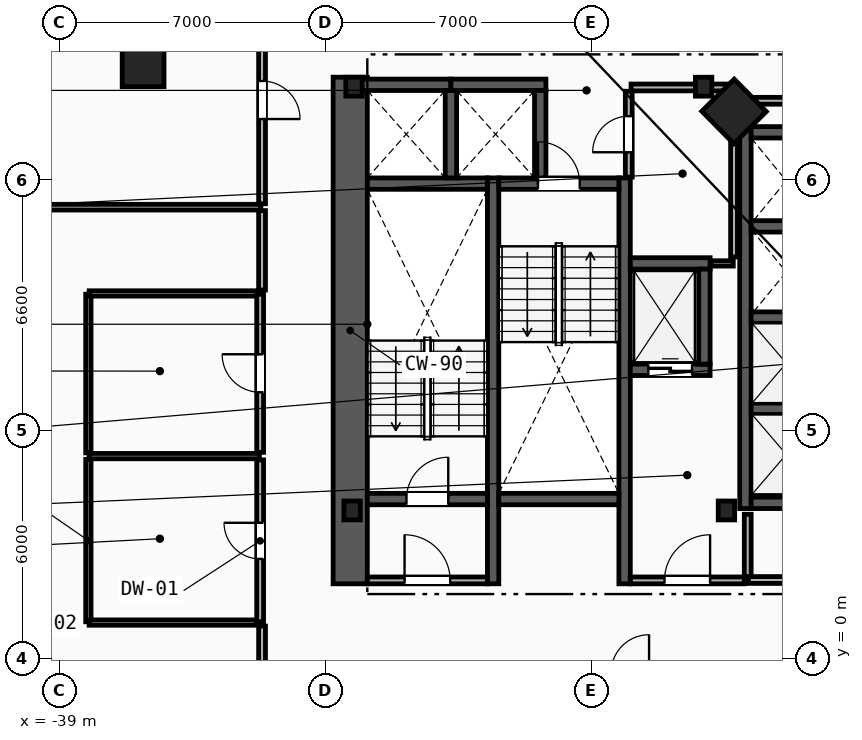
"""IFC4 building model, lengths in metres.
Left out: names, types, materials, properties, quantities, classifications, styles, units other than length and angle.
Written with IfcOpenShell. Run it as: python <this file> out.ifc"""

import sys

from ifc_helpers import new_model, si_unit, direction, frame, frame_2d, origin, origin_2d, place, context, subcontext, project, spatial, rectangle, i_section, extrude, element, fill, save


model = new_model("IFC4")
c1 = context("Model", 3, precision=1e-05, world=origin(), true_north=direction((0.0, 1.0)))
c2 = subcontext(c1, "Body", "Model", "MODEL_VIEW")
j1 = project(units=[si_unit("LENGTHUNIT", "METRE"), si_unit("PLANEANGLEUNIT", "RADIAN")], contexts=[c1])
p1 = place(None, origin())
s1 = spatial("IfcSite", under=j1, at=p1, CompositionType="ELEMENT")
p2 = place(p1, origin())
s2 = spatial("IfcBuilding", under=s1, at=p2, CompositionType="ELEMENT")
p3 = place(p2, frame((0.0, 0.0, 65.8)))
s3 = spatial("IfcBuildingStorey", under=s2, at=p3, CompositionType="ELEMENT", Elevation=65.8)
for number, where, z_axis, x_axis in (
    (1, (-31.3, 3.9, 0.0), (0.0, 0.0, 1.0), (1.0, 0.0, 0.0)),
    (2, (-21.45, 3.9, 0.0), (0.0, 0.0, 1.0), (1.0, 0.0, 0.0)),
    (3, (-22.05, 15.05, 0.0), (0.0, 0.0, 1.0), (1.0, 0.0, 0.0)),
    (4, (-31.25, 15.05, 0.0), (0.0, 0.0, 1.0), (1.0, 0.0, 0.0)),
):
    element("IfcColumn", number, at=place(p3, frame(where, z_axis=z_axis, x_axis=x_axis)), inside=s3, PredefinedType="COLUMN", context=c2, shape_type="SweptSolid", body=[
        extrude(i_section(OverallWidth=0.432, OverallDepth=0.498, WebThickness=0.056, FlangeThickness=0.089, FilletRadius=0.018, at=origin_2d()), origin(), (0.0, 0.0, 1.0), 3.8),
    ])
p4 = place(p3, frame((-36.8, 15.6, 0.0), z_axis=(0.0, 0.0, 1.0), x_axis=(1.0, 0.0, 0.0)))
e5 = element("IfcColumn", 5, at=p4, inside=s3, PredefinedType="COLUMN", context=c2, shape_type="SweptSolid", body=[
    extrude(rectangle(XDim=1.1, YDim=1.1, at=origin_2d()), origin(), (0.0, 0.0, 1.0), 3.8),
])
p5 = place(p3, frame((-21.25, 14.4, 0.0), z_axis=(0.0, 0.0, 1.0), x_axis=(-0.703270634186, 0.710922228581, 0.0)))
e6 = element("IfcColumn", 6, at=p5, inside=s3, PredefinedType="COLUMN", context=c2, shape_type="SweptSolid", body=[
    extrude(rectangle(XDim=1.2, YDim=1.2, at=origin_2d()), origin(), (0.0, 0.0, 1.0), 3.8),
])
p6 = place(p3, frame((-31.35, 1.97, 0.0), z_axis=(0.0, 0.0, 1.0), x_axis=(0.0, 1.0, 0.0)))
e7 = element("IfcWall", 7, at=p6, inside=s3, PredefinedType="SHEAR", context=c2, shape_type="SweptSolid", body=[
    extrude(rectangle(XDim=13.33, YDim=0.9, at=frame_2d((6.665, 0.0))), origin(), (0.0, 0.0, 1.0), 3.5),
])
for number, where, z_axis, x_axis in (
    (8, (-27.59, 1.97, 0.0), (0.0, 0.0, 1.0), (0.0, 1.0, 0.0)),
    (9, (-24.13, 1.97, 0.0), (0.0, 0.0, 1.0), (0.0, 1.0, 0.0)),
):
    element("IfcWall", number, at=place(p3, frame(where, z_axis=z_axis, x_axis=x_axis)), inside=s3, PredefinedType="SHEAR", context=c2, shape_type="SweptSolid", body=[
        extrude(rectangle(XDim=10.68, YDim=0.3, at=frame_2d((5.34, 0.0))), origin(), (0.0, 0.0, 1.0), 3.5),
    ])
p7 = place(p3, frame((-30.9, 4.2, 0.0), z_axis=(0.0, 0.0, 1.0), x_axis=(1.0, 0.0, 0.0)))
e10 = element("IfcWall", 10, at=p7, inside=s3, PredefinedType="SHEAR", context=c2, shape_type="SweptSolid", body=[
    extrude(rectangle(XDim=3.16, YDim=0.3, at=frame_2d((1.58, 0.0))), origin(), (0.0, 0.0, 1.0), 3.5),
])
p8 = place(p7, frame((1.03, 0.0, 0.0)))
e11 = element("IfcOpeningElement", 11, at=p8, cuts=e10, PredefinedType="OPENING", context=c2, shape_type="SweptSolid", body=[
    extrude(rectangle(XDim=1.1, YDim=2.15, at=frame_2d((0.55, 1.075))), frame((0.0, 0.16, 0.0), z_axis=(0.0, -1.0, 0.0), x_axis=(1.0, 0.0, 0.0)), (0.0, 0.0, 1.0), 0.32),
])
p9 = place(p3, frame((-30.9, 12.5, 0.0), z_axis=(0.0, 0.0, 1.0), x_axis=(1.0, 0.0, 0.0)))
e12 = element("IfcWall", 12, at=p9, inside=s3, PredefinedType="SHEAR", context=c2, shape_type="SweptSolid", body=[
    extrude(rectangle(XDim=3.16, YDim=0.3, at=frame_2d((1.58, 0.0))), origin(), (0.0, 0.0, 1.0), 3.5),
])
p10 = place(p3, frame((-27.44, 12.5, 0.0), z_axis=(0.0, 0.0, 1.0), x_axis=(1.0, 0.0, 0.0)))
e13 = element("IfcWall", 13, at=p10, inside=s3, PredefinedType="SHEAR", context=c2, shape_type="SweptSolid", body=[
    extrude(rectangle(XDim=3.16, YDim=0.3, at=frame_2d((1.58, 0.0))), origin(), (0.0, 0.0, 1.0), 3.5),
])
p11 = place(p10, frame((1.03, 0.0, 0.0)))
e14 = element("IfcOpeningElement", 14, at=p11, cuts=e13, PredefinedType="OPENING", context=c2, shape_type="SweptSolid", body=[
    extrude(rectangle(XDim=1.1, YDim=2.15, at=frame_2d((0.55, 1.075))), frame((0.0, 0.16, 0.0), z_axis=(0.0, -1.0, 0.0), x_axis=(1.0, 0.0, 0.0)), (0.0, 0.0, 1.0), 0.32),
])
p12 = place(p3, frame((-27.44, 4.2, 0.0), z_axis=(0.0, 0.0, 1.0), x_axis=(1.0, 0.0, 0.0)))
e15 = element("IfcWall", 15, at=p12, inside=s3, PredefinedType="SHEAR", context=c2, shape_type="SweptSolid", body=[
    extrude(rectangle(XDim=3.16, YDim=0.3, at=frame_2d((1.58, 0.0))), origin(), (0.0, 0.0, 1.0), 3.5),
])
p13 = place(p3, frame((-20.89, 2.15, 0.0), z_axis=(0.0, 0.0, 1.0), x_axis=(0.0, 1.0, 0.0)))
e16 = element("IfcWall", 16, at=p13, inside=s3, PredefinedType="PARTITIONING", context=c2, shape_type="SweptSolid", body=[
    extrude(rectangle(XDim=1.65, YDim=0.18, at=frame_2d((0.825, 0.0))), origin(), (0.0, 0.0, 1.0), 3.5),
])
p14 = place(p3, frame((-23.98, 2.06, 0.0), z_axis=(0.0, 0.0, 1.0), x_axis=(1.0, 0.0, 0.0)))
e17 = element("IfcWall", 17, at=p14, inside=s3, PredefinedType="PARTITIONING", context=c2, shape_type="SweptSolid", body=[
    extrude(rectangle(XDim=3.0, YDim=0.18, at=frame_2d((1.5, 0.0))), origin(), (0.0, 0.0, 1.0), 3.5),
])
p15 = place(p14, frame((0.9, 0.0, 0.0)))
e18 = element("IfcOpeningElement", 18, at=p15, cuts=e17, PredefinedType="OPENING", context=c2, shape_type="SweptSolid", body=[
    extrude(rectangle(XDim=1.2, YDim=2.15, at=frame_2d((0.6, 1.075))), frame((0.0, 0.1, 0.0), z_axis=(0.0, -1.0, 0.0), x_axis=(1.0, 0.0, 0.0)), (0.0, 0.0, 1.0), 0.2),
])
p16 = place(p3, frame((-30.9, 2.06, 0.0), z_axis=(0.0, 0.0, 1.0), x_axis=(1.0, 0.0, 0.0)))
e19 = element("IfcWall", 19, at=p16, inside=s3, PredefinedType="PARTITIONING", context=c2, shape_type="SweptSolid", body=[
    extrude(rectangle(XDim=3.16, YDim=0.18, at=frame_2d((1.58, 0.0))), origin(), (0.0, 0.0, 1.0), 3.5),
])
p17 = place(p16, frame((0.98, 0.0, 0.0)))
e20 = element("IfcOpeningElement", 20, at=p17, cuts=e19, PredefinedType="OPENING", context=c2, shape_type="SweptSolid", body=[
    extrude(rectangle(XDim=1.2, YDim=2.15, at=frame_2d((0.6, 1.075))), frame((0.0, 0.1, 0.0), z_axis=(0.0, -1.0, 0.0), x_axis=(1.0, 0.0, 0.0)), (0.0, 0.0, 1.0), 0.2),
])
p18 = place(p3, frame((-23.98, 7.6, 0.0), z_axis=(0.0, 0.0, 1.0), x_axis=(1.0, 0.0, 0.0)))
e21 = element("IfcWall", 21, at=p18, inside=s3, PredefinedType="SHEAR", context=c2, shape_type="SweptSolid", body=[
    extrude(rectangle(XDim=2.1, YDim=0.3, at=frame_2d((1.05, 0.0))), origin(), (0.0, 0.0, 1.0), 3.5),
])
p19 = place(p18, frame((0.475, 0.0, 0.0)))
e22 = element("IfcOpeningElement", 22, at=p19, cuts=e21, PredefinedType="OPENING", context=c2, shape_type="SweptSolid", body=[
    extrude(rectangle(XDim=1.15, YDim=2.2, at=frame_2d((0.575, 1.1))), frame((0.0, 0.16, 0.0), z_axis=(0.0, -1.0, 0.0), x_axis=(1.0, 0.0, 0.0)), (0.0, 0.0, 1.0), 0.32),
])
p20 = place(p3, frame((-23.98, 10.4, 0.0), z_axis=(0.0, 0.0, 1.0), x_axis=(1.0, 0.0, 0.0)))
e23 = element("IfcWall", 23, at=p20, inside=s3, PredefinedType="SHEAR", context=c2, shape_type="SweptSolid", body=[
    extrude(rectangle(XDim=2.1, YDim=0.3, at=frame_2d((1.05, 0.0))), origin(), (0.0, 0.0, 1.0), 3.5),
])
for number, where, z_axis, x_axis in (
    (24, (-22.03, 7.75, 0.0), (0.0, 0.0, 1.0), (0.0, 1.0, 0.0)),
    (25, (-31.2, 15.1, 0.0), (0.0, 0.0, 1.0), (1.0, 0.0, 0.0)),
):
    element("IfcWall", number, at=place(p3, frame(where, z_axis=z_axis, x_axis=x_axis)), inside=s3, PredefinedType="SHEAR", context=c2, shape_type="SweptSolid", body=[
        extrude(rectangle(XDim=2.5, YDim=0.3, at=frame_2d((1.25, 0.0))), origin(), (0.0, 0.0, 1.0), 3.5),
    ])
p21 = place(p3, frame((-28.7, 12.65, 0.0), z_axis=(0.0, 0.0, 1.0), x_axis=(0.0, 1.0, 0.0)))
e26 = element("IfcWall", 26, at=p21, inside=s3, PredefinedType="SHEAR", context=c2, shape_type="SweptSolid", body=[
    extrude(rectangle(XDim=2.3, YDim=0.3, at=frame_2d((1.15, 0.0))), origin(), (0.0, 0.0, 1.0), 3.5),
])
p22 = place(p3, frame((-28.7, 15.1, 0.0), z_axis=(0.0, 0.0, 1.0), x_axis=(1.0, 0.0, 0.0)))
e27 = element("IfcWall", 27, at=p22, inside=s3, PredefinedType="SHEAR", context=c2, shape_type="SweptSolid", body=[
    extrude(rectangle(XDim=2.5, YDim=0.3, at=frame_2d((1.25, 0.0))), origin(), (0.0, 0.0, 1.0), 3.5),
])
p23 = place(p3, frame((-26.35, 12.65, 0.0), z_axis=(0.0, 0.0, 1.0), x_axis=(0.0, 1.0, 0.0)))
e28 = element("IfcWall", 28, at=p23, inside=s3, PredefinedType="SHEAR", context=c2, shape_type="SweptSolid", body=[
    extrude(rectangle(XDim=2.3, YDim=0.3, at=frame_2d((1.15, 0.0))), origin(), (0.0, 0.0, 1.0), 3.5),
])
p24 = place(p3, frame((-20.95, 3.95, 0.0), z_axis=(0.0, 0.0, 1.0), x_axis=(0.0, 1.0, 0.0)))
e29 = element("IfcWall", 29, at=p24, inside=s3, PredefinedType="SHEAR", context=c2, shape_type="SweptSolid", body=[
    extrude(rectangle(XDim=10.05, YDim=0.3, at=frame_2d((5.025, 0.0))), origin(), (0.0, 0.0, 1.0), 3.5),
])
for number, where, z_axis, x_axis in (
    (30, (-20.8, 4.1, 0.0), (0.0, 0.0, 1.0), (1.0, 0.0, 0.0)),
    (31, (-20.8, 13.85, 0.0), (0.0, 0.0, 1.0), (1.0, 0.0, 0.0)),
):
    element("IfcWall", number, at=place(p3, frame(where, z_axis=z_axis, x_axis=x_axis)), inside=s3, PredefinedType="SHEAR", context=c2, shape_type="SweptSolid", body=[
        extrude(rectangle(XDim=2.15, YDim=0.3, at=frame_2d((1.075, 0.0))), origin(), (0.0, 0.0, 1.0), 3.5),
    ])
for number, where, z_axis, x_axis in (
    (32, (-20.8, 6.575, 0.0), (0.0, 0.0, 1.0), (1.0, 0.0, 0.0)),
    (33, (-20.8, 8.975, 0.0), (0.0, 0.0, 1.0), (1.0, 0.0, 0.0)),
    (34, (-20.8, 11.375, 0.0), (0.0, 0.0, 1.0), (1.0, 0.0, 0.0)),
):
    element("IfcWall", number, at=place(p3, frame(where, z_axis=z_axis, x_axis=x_axis)), inside=s3, PredefinedType="SHEAR", context=c2, shape_type="SweptSolid", body=[
        extrude(rectangle(XDim=1.85, YDim=0.3, at=frame_2d((0.925, 0.0))), origin(), (0.0, 0.0, 1.0), 3.5),
    ])
p25 = place(p3, frame((-20.87, 2.07, 0.0), z_axis=(0.0, 0.0, 1.0), x_axis=(1.0, 0.0, 0.0)))
e35 = element("IfcWall", 35, at=p25, inside=s3, PredefinedType="PARTITIONING", context=c2, shape_type="SweptSolid", body=[
    extrude(rectangle(XDim=3.83, YDim=0.18, at=frame_2d((1.915, 0.0))), origin(), (0.0, 0.0, 1.0), 3.5),
])
p26 = place(p25, frame((1.44, 0.0, 0.0)))
e36 = element("IfcOpeningElement", 36, at=p26, cuts=e35, PredefinedType="OPENING", context=c2, shape_type="SweptSolid", body=[
    extrude(rectangle(XDim=0.95, YDim=2.1, at=frame_2d((0.475, 1.05))), frame((0.0, 0.1, 0.0), z_axis=(0.0, -1.0, 0.0), x_axis=(1.0, 0.0, 0.0)), (0.0, 0.0, 1.0), 0.2),
])
p27 = place(p3, frame((-21.86, 10.4, 0.0), z_axis=(0.0, 0.0, 1.0), x_axis=(1.0, 0.0, 0.0)))
e37 = element("IfcWall", 37, at=p27, inside=s3, PredefinedType="PARTITIONING", context=c2, shape_type="SweptSolid", body=[
    extrude(rectangle(XDim=0.59, YDim=0.14, at=frame_2d((0.295, 0.0))), origin(), (0.0, 0.0, 1.0), 3.5),
])
p28 = place(p3, frame((-21.25, 10.57, 0.0), z_axis=(0.0, 0.0, 1.0), x_axis=(0.0, 1.0, 0.0)))
e38 = element("IfcWall", 38, at=p28, inside=s3, PredefinedType="PARTITIONING", context=c2, shape_type="SweptSolid", body=[
    extrude(rectangle(XDim=4.36, YDim=0.18, at=frame_2d((2.18, 0.0))), origin(), (0.0, 0.0, 1.0), 3.5),
])
p29 = place(p3, frame((-23.96, 15.03, 0.0), z_axis=(0.0, 0.0, 1.0), x_axis=(1.0, 0.0, 0.0)))
e39 = element("IfcWall", 39, at=p29, inside=s3, PredefinedType="PARTITIONING", context=c2, shape_type="SweptSolid", body=[
    extrude(rectangle(XDim=2.61, YDim=0.18, at=frame_2d((1.305, 0.0))), origin(), (0.0, 0.0, 1.0), 2.573),
])
p30 = place(p3, frame((-24.02, 12.67, 0.0), z_axis=(0.0, 0.0, 1.0), x_axis=(0.0, 1.0, 0.0)))
e40 = element("IfcWall", 40, at=p30, inside=s3, PredefinedType="PARTITIONING", context=c2, shape_type="SweptSolid", body=[
    extrude(rectangle(XDim=2.26, YDim=0.18, at=frame_2d((1.13, 0.0))), origin(), (0.0, 0.0, 1.0), 3.5),
])
p31 = place(p30, frame((0.655, 0.0, 0.0)))
e41 = element("IfcOpeningElement", 41, at=p31, cuts=e40, PredefinedType="OPENING", context=c2, shape_type="SweptSolid", body=[
    extrude(rectangle(XDim=0.95, YDim=2.1, at=frame_2d((0.475, 1.05))), frame((0.0, 0.1, 0.0), z_axis=(0.0, -1.0, 0.0), x_axis=(1.0, 0.0, 0.0)), (0.0, 0.0, 1.0), 0.2),
])
p32 = place(p3, frame((-38.24, 0.97, 0.0), z_axis=(0.0, 0.0, 1.0), x_axis=(0.0, 1.0, 0.0)))
e42 = element("IfcWall", 42, at=p32, inside=s3, PredefinedType="PARTITIONING", context=c2, shape_type="SweptSolid", body=[
    extrude(rectangle(XDim=4.275, YDim=0.14, at=frame_2d((2.138, 0.0))), origin(), (0.0, 0.0, 1.0), 3.5),
])
p33 = place(p3, frame((-38.24, 5.415, 0.0), z_axis=(0.0, 0.0, 1.0), x_axis=(0.0, 1.0, 0.0)))
e43 = element("IfcWall", 43, at=p33, inside=s3, PredefinedType="PARTITIONING", context=c2, shape_type="SweptSolid", body=[
    extrude(rectangle(XDim=4.175, YDim=0.14, at=frame_2d((2.087, 0.0))), origin(), (0.0, 0.0, 1.0), 3.5),
])
for number, where, z_axis, x_axis in (
    (44, (-38.22, 0.95, 0.0), (0.0, 0.0, 1.0), (1.0, 0.0, 0.0)),
    (45, (-38.22, 5.33, 0.0), (0.0, 0.0, 1.0), (1.0, 0.0, 0.0)),
    (46, (-38.22, 9.61, 0.0), (0.0, 0.0, 1.0), (1.0, 0.0, 0.0)),
):
    element("IfcWall", number, at=place(p3, frame(where, z_axis=z_axis, x_axis=x_axis)), inside=s3, PredefinedType="PARTITIONING", context=c2, shape_type="SweptSolid", body=[
        extrude(rectangle(XDim=4.48, YDim=0.14, at=frame_2d((2.24, 0.0))), origin(), (0.0, 0.0, 1.0), 3.5),
    ])
p34 = place(p3, frame((-33.72, 0.97, 0.0), z_axis=(0.0, 0.0, 1.0), x_axis=(0.0, 1.0, 0.0)))
e47 = element("IfcWall", 47, at=p34, inside=s3, PredefinedType="PARTITIONING", context=c2, shape_type="SweptSolid", body=[
    extrude(rectangle(XDim=4.26, YDim=0.18, at=frame_2d((2.13, 0.0))), origin(), (0.0, 0.0, 1.0), 3.5),
])
p35 = place(p34, frame((1.655, 0.0, 0.0)))
e48 = element("IfcOpeningElement", 48, at=p35, cuts=e47, PredefinedType="OPENING", context=c2, shape_type="SweptSolid", body=[
    extrude(rectangle(XDim=0.95, YDim=2.1, at=frame_2d((0.475, 1.05))), frame((0.0, 0.1, 0.0), z_axis=(0.0, -1.0, 0.0), x_axis=(1.0, 0.0, 0.0)), (0.0, 0.0, 1.0), 0.2),
])
p36 = place(p3, frame((-33.72, 5.43, 0.0), z_axis=(0.0, 0.0, 1.0), x_axis=(0.0, 1.0, 0.0)))
e49 = element("IfcWall", 49, at=p36, inside=s3, PredefinedType="PARTITIONING", context=c2, shape_type="SweptSolid", body=[
    extrude(rectangle(XDim=4.16, YDim=0.18, at=frame_2d((2.08, 0.0))), origin(), (0.0, 0.0, 1.0), 3.5),
])
p37 = place(p36, frame((1.58, 0.0, 0.0)))
e50 = element("IfcOpeningElement", 50, at=p37, cuts=e49, PredefinedType="OPENING", context=c2, shape_type="SweptSolid", body=[
    extrude(rectangle(XDim=1.0, YDim=2.15, at=frame_2d((0.5, 1.075))), frame((0.0, 0.1, 0.0), z_axis=(0.0, -1.0, 0.0), x_axis=(1.0, 0.0, 0.0)), (0.0, 0.0, 1.0), 0.2),
])
p38 = place(p3, frame((-50.141, 11.88, 0.0), z_axis=(0.0, 0.0, 1.0), x_axis=(1.0, 0.0, 0.0)))
e51 = element("IfcWall", 51, at=p38, inside=s3, PredefinedType="PARTITIONING", context=c2, shape_type="SweptSolid", body=[
    extrude(rectangle(XDim=16.441, YDim=0.15, at=frame_2d((8.22, 0.0))), origin(), (0.0, 0.0, 1.0), 3.5),
])
p39 = place(p3, frame((-33.67, 0.859, 0.0), z_axis=(0.0, 0.0, 1.0), x_axis=(0.0, -1.0, 0.0)))
e52 = element("IfcWall", 52, at=p39, inside=s3, PredefinedType="PARTITIONING", context=c2, shape_type="SweptSolid", body=[
    extrude(rectangle(XDim=6.629, YDim=0.18, at=frame_2d((3.314, 0.0))), origin(), (0.0, 0.0, 1.0), 3.5),
])
p40 = place(p39, frame((2.814, 0.0, 0.0)))
e53 = element("IfcOpeningElement", 53, at=p40, cuts=e52, PredefinedType="OPENING", context=c2, shape_type="SweptSolid", body=[
    extrude(rectangle(XDim=1.0, YDim=2.15, at=frame_2d((0.5, 1.075))), frame((0.0, 0.1, 0.0), z_axis=(0.0, -1.0, 0.0), x_axis=(1.0, 0.0, 0.0)), (0.0, 0.0, 1.0), 0.2),
])
p41 = place(p3, frame((-33.67, 11.79, 0.0), z_axis=(0.0, 0.0, 1.0), x_axis=(0.0, -1.0, 0.0)))
e54 = element("IfcWall", 54, at=p41, inside=s3, PredefinedType="PARTITIONING", context=c2, shape_type="SweptSolid", body=[
    extrude(rectangle(XDim=2.089, YDim=0.18, at=frame_2d((1.044, 0.0))), origin(), (0.0, 0.0, 1.0), 3.5),
])
p42 = place(p3, frame((-21.178, 14.68, 0.0), z_axis=(0.0, 0.0, 1.0), x_axis=(1.0, 0.0, 0.0)))
e55 = element("IfcWall", 55, at=p42, inside=s3, PredefinedType="PARTITIONING", context=c2, shape_type="SweptSolid", body=[
    extrude(rectangle(XDim=4.357, YDim=0.18, at=frame_2d((2.178, 0.0))), origin(), (0.0, 0.0, 1.0), 3.5),
])
p43 = place(p3, frame((-33.67, 17.428, 0.0), z_axis=(0.0, 0.0, 1.0), x_axis=(0.0, -1.0, 0.0)))
e56 = element("IfcWall", 56, at=p43, inside=s3, PredefinedType="PARTITIONING", context=c2, shape_type="SweptSolid", body=[
    extrude(rectangle(XDim=5.458, YDim=0.18, at=frame_2d((2.729, 0.0))), origin(), (0.0, 0.0, 1.0), 3.5),
])
p44 = place(p43, frame((2.229, 0.0, 0.0)))
e57 = element("IfcOpeningElement", 57, at=p44, cuts=e56, PredefinedType="OPENING", context=c2, shape_type="SweptSolid", body=[
    extrude(rectangle(XDim=1.0, YDim=2.15, at=frame_2d((0.5, 1.075))), frame((0.0, 0.1, 0.0), z_axis=(0.0, -1.0, 0.0), x_axis=(1.0, 0.0, 0.0)), (0.0, 0.0, 1.0), 0.2),
])
p45 = place(p8, origin())
e58 = element("IfcDoor", 58, at=p45, inside=s3, OperationType="SINGLE_SWING_RIGHT", PredefinedType="DOOR", context=c2, shape_type="SweptSolid", body=[
    extrude(rectangle(XDim=1.1, YDim=2.15, at=frame_2d((0.55, 1.075))), frame((0.0, 0.025, 0.0), z_axis=(0.0, -1.0, 0.0), x_axis=(1.0, 0.0, 0.0)), (0.0, 0.0, 1.0), 0.05),
])
fill(e11, e58)
p46 = place(p11, origin())
e59 = element("IfcDoor", 59, at=p46, inside=s3, OperationType="SINGLE_SWING_LEFT", PredefinedType="DOOR", context=c2, shape_type="SweptSolid", body=[
    extrude(rectangle(XDim=1.1, YDim=2.15, at=frame_2d((0.55, 1.075))), frame((0.0, 0.025, 0.0), z_axis=(0.0, -1.0, 0.0), x_axis=(1.0, 0.0, 0.0)), (0.0, 0.0, 1.0), 0.05),
])
fill(e14, e59)
p47 = place(p15, origin())
e60 = element("IfcDoor", 60, at=p47, inside=s3, OperationType="SINGLE_SWING_RIGHT", PredefinedType="DOOR", context=c2, shape_type="SweptSolid", body=[
    extrude(rectangle(XDim=1.2, YDim=2.15, at=frame_2d((0.6, 1.075))), frame((0.0, 0.025, 0.0), z_axis=(0.0, -1.0, 0.0), x_axis=(1.0, 0.0, 0.0)), (0.0, 0.0, 1.0), 0.05),
])
fill(e18, e60)
p48 = place(p17, origin())
e61 = element("IfcDoor", 61, at=p48, inside=s3, OperationType="SINGLE_SWING_LEFT", PredefinedType="DOOR", context=c2, shape_type="SweptSolid", body=[
    extrude(rectangle(XDim=1.2, YDim=2.15, at=frame_2d((0.6, 1.075))), frame((0.0, 0.025, 0.0), z_axis=(0.0, -1.0, 0.0), x_axis=(1.0, 0.0, 0.0)), (0.0, 0.0, 1.0), 0.05),
])
fill(e20, e61)
p49 = place(p19, origin())
e62 = element("IfcDoor", 62, at=p49, inside=s3, OperationType="SLIDING_TO_LEFT", PredefinedType="TRAPDOOR", context=c2, shape_type="SweptSolid", body=[
    extrude(rectangle(XDim=1.15, YDim=2.2, at=frame_2d((0.575, 1.1))), frame((0.0, 0.025, 0.0), z_axis=(0.0, -1.0, 0.0), x_axis=(1.0, 0.0, 0.0)), (0.0, 0.0, 1.0), 0.05),
])
fill(e22, e62)
p50 = place(p44, origin())
e63 = element("IfcDoor", 63, at=p50, inside=s3, OperationType="SINGLE_SWING_RIGHT", PredefinedType="DOOR", context=c2, shape_type="SweptSolid", body=[
    extrude(rectangle(XDim=1.0, YDim=2.15, at=frame_2d((0.5, 1.075))), frame((0.0, 0.025, 0.0), z_axis=(0.0, -1.0, 0.0), x_axis=(1.0, 0.0, 0.0)), (0.0, 0.0, 1.0), 0.05),
])
fill(e57, e63)
p51 = place(p35, origin())
e64 = element("IfcDoor", 64, at=p51, inside=s3, OperationType="SINGLE_SWING_RIGHT", PredefinedType="DOOR", context=c2, shape_type="SweptSolid", body=[
    extrude(rectangle(XDim=0.95, YDim=2.1, at=frame_2d((0.475, 1.05))), frame((0.0, 0.025, 0.0), z_axis=(0.0, -1.0, 0.0), x_axis=(1.0, 0.0, 0.0)), (0.0, 0.0, 1.0), 0.05),
])
fill(e48, e64)
p52 = place(p37, origin())
e65 = element("IfcDoor", 65, at=p52, inside=s3, OperationType="SINGLE_SWING_RIGHT", PredefinedType="DOOR", context=c2, shape_type="SweptSolid", body=[
    extrude(rectangle(XDim=1.0, YDim=2.15, at=frame_2d((0.5, 1.075))), frame((0.0, 0.025, 0.0), z_axis=(0.0, -1.0, 0.0), x_axis=(1.0, 0.0, 0.0)), (0.0, 0.0, 1.0), 0.05),
])
fill(e50, e65)
p53 = place(p31, origin())
e66 = element("IfcDoor", 66, at=p53, inside=s3, OperationType="SINGLE_SWING_LEFT", PredefinedType="DOOR", context=c2, shape_type="SweptSolid", body=[
    extrude(rectangle(XDim=0.95, YDim=2.1, at=frame_2d((0.475, 1.05))), frame((0.0, 0.025, 0.0), z_axis=(0.0, -1.0, 0.0), x_axis=(1.0, 0.0, 0.0)), (0.0, 0.0, 1.0), 0.05),
])
fill(e41, e66)
save(model, sys.argv[1])
